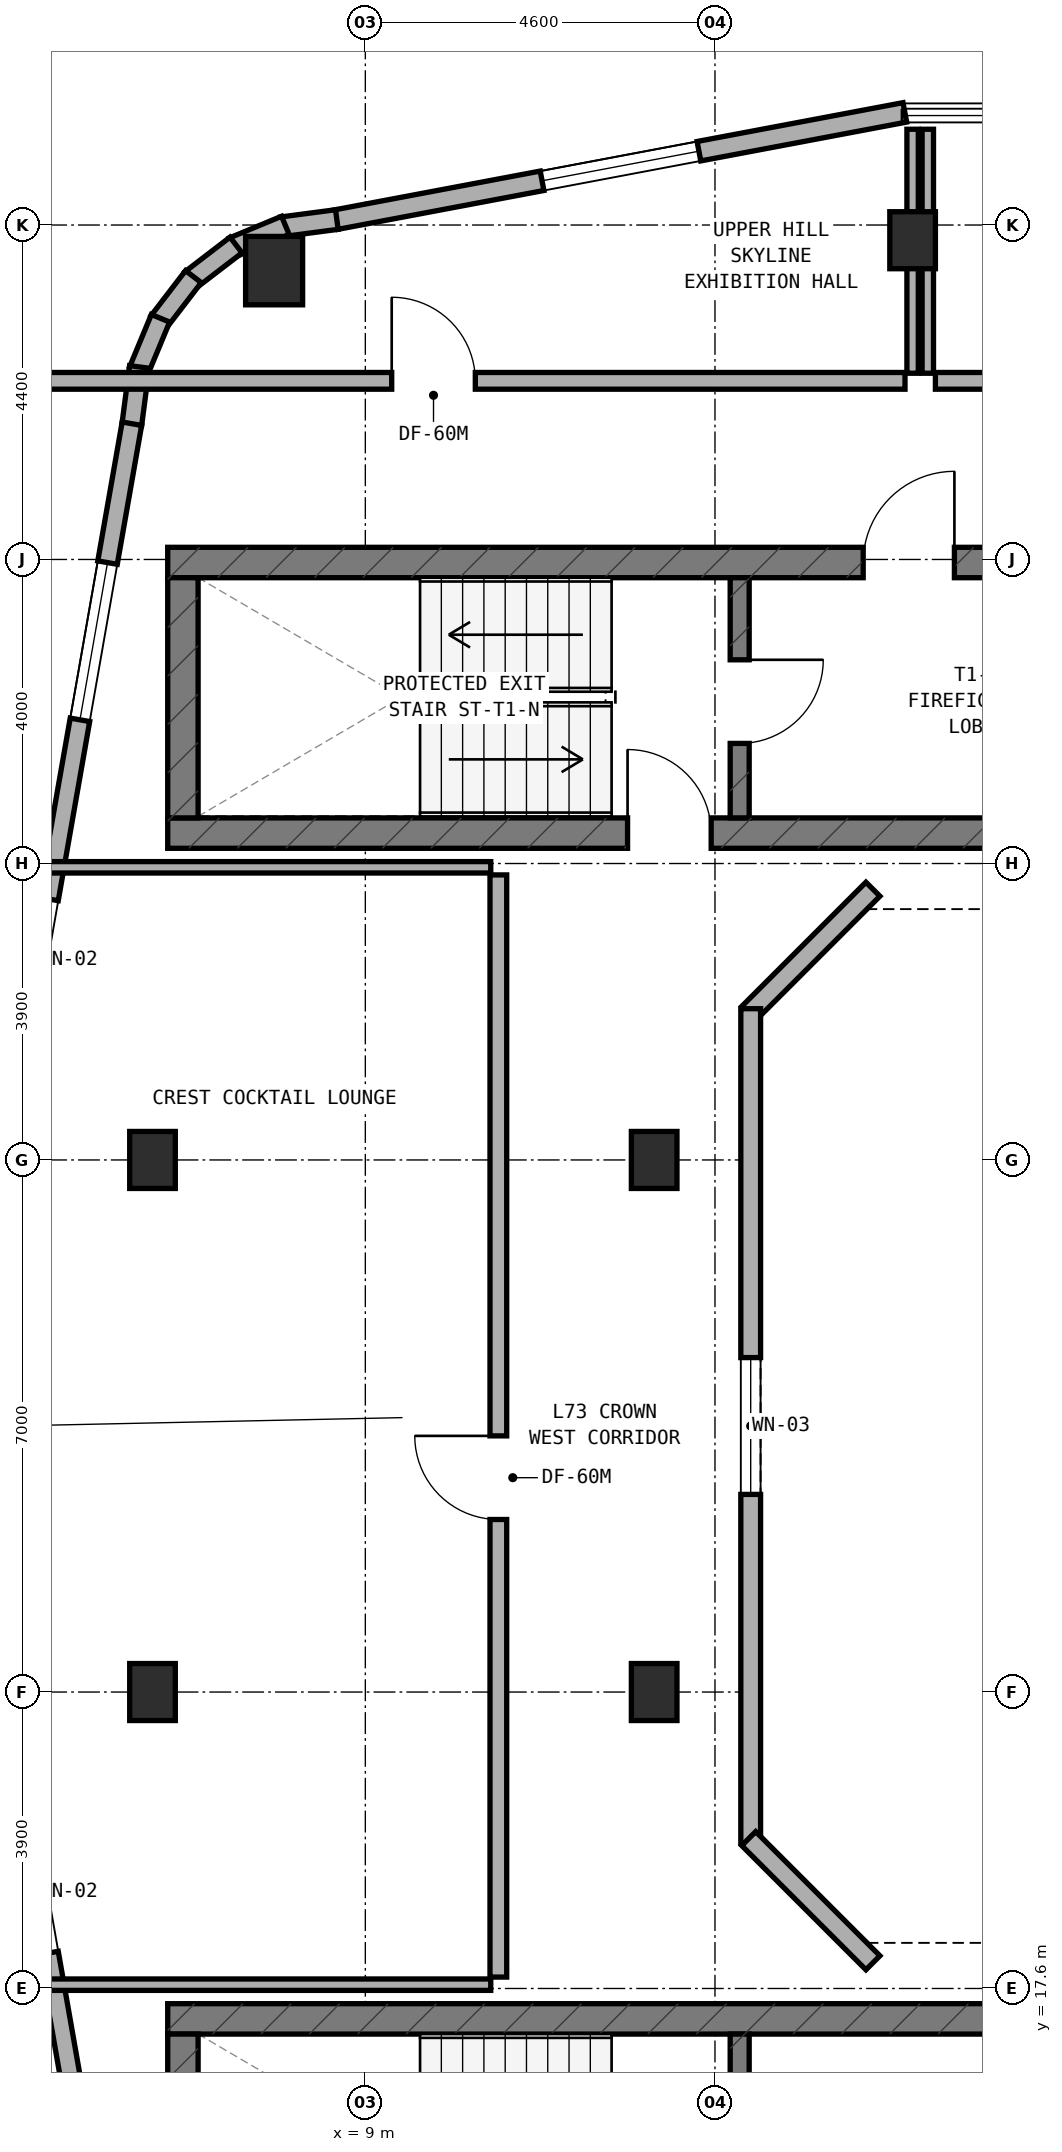
"""IFC4 building model, lengths in metres.
Left out: names, types, materials, properties, quantities, classifications, styles, units other than length and angle.
Written with IfcOpenShell. Run it as: python <this file> out.ifc"""

import sys

from ifc_helpers import new_model, si_unit, direction, frame, frame_2d, origin, origin_2d, place, context, subcontext, project, spatial, rectangle, extrude, element, fill, save


model = new_model("IFC4")
c1 = context("Model", 3, precision=1e-05, world=origin(), true_north=direction((0.0, 1.0)))
c2 = subcontext(c1, "Body", "Model", "MODEL_VIEW")
j1 = project(units=[si_unit("LENGTHUNIT", "METRE"), si_unit("PLANEANGLEUNIT", "RADIAN")], contexts=[c1])
p1 = place(None, origin())
s1 = spatial("IfcSite", under=j1, at=p1, CompositionType="ELEMENT")
p2 = place(p1, origin())
s2 = spatial("IfcBuilding", under=s1, at=p2, CompositionType="ELEMENT")
p3 = place(p2, frame((0.0, 0.0, 268.4)))
s3 = spatial("IfcBuildingStorey", under=s2, at=p3, CompositionType="ELEMENT", Elevation=268.4)
p4 = place(p3, frame((6.4, 32.8, 0.0), z_axis=(0.0, 0.0, 1.0), x_axis=(1.0, 0.0, 0.0)))
e1 = element("IfcWall", 1, at=p4, inside=s3, PredefinedType="SHEAR", context=c2, shape_type="SweptSolid", body=[
    extrude(rectangle(XDim=24.4, YDim=0.4, at=frame_2d((12.2, 0.0))), origin(), (0.0, 0.0, 1.0), 3.6),
])
p5 = place(p4, frame((6.05, 0.0, 0.0)))
e2 = element("IfcOpeningElement", 2, at=p5, cuts=e1, PredefinedType="OPENING", context=c2, shape_type="SweptSolid", body=[
    extrude(rectangle(XDim=1.1, YDim=2.15, at=frame_2d((0.55, 1.075))), frame((0.0, 0.21, 0.0), z_axis=(0.0, -1.0, 0.0), x_axis=(1.0, 0.0, 0.0)), (0.0, 0.0, 1.0), 0.42),
])
p6 = place(p3, frame((6.4, 36.36, 0.0), z_axis=(0.0, 0.0, 1.0), x_axis=(1.0, 0.0, 0.0)))
e3 = element("IfcWall", 3, at=p6, inside=s3, PredefinedType="SHEAR", context=c2, shape_type="SweptSolid", body=[
    extrude(rectangle(XDim=24.4, YDim=0.4, at=frame_2d((12.2, 0.0))), origin(), (0.0, 0.0, 1.0), 3.6),
])
p7 = place(p6, frame((9.15, 0.0, 0.0)))
e4 = element("IfcOpeningElement", 4, at=p7, cuts=e3, PredefinedType="OPENING", context=c2, shape_type="SweptSolid", body=[
    extrude(rectangle(XDim=1.2, YDim=2.15, at=frame_2d((0.6, 1.075))), frame((0.0, 0.21, 0.0), z_axis=(0.0, -1.0, 0.0), x_axis=(1.0, 0.0, 0.0)), (0.0, 0.0, 1.0), 0.42),
])
p8 = place(p6, frame((19.2, 0.0, 0.0)))
e5 = element("IfcOpeningElement", 5, at=p8, cuts=e3, PredefinedType="OPENING", context=c2, shape_type="SweptSolid", body=[
    extrude(rectangle(XDim=0.85, YDim=2.1, at=frame_2d((0.425, 1.05))), frame((0.0, 0.21, 0.0), z_axis=(0.0, -1.0, 0.0), x_axis=(1.0, 0.0, 0.0)), (0.0, 0.0, 1.0), 0.42),
])
p9 = place(p6, frame((16.94, 0.0, 0.0)))
e6 = element("IfcOpeningElement", 6, at=p9, cuts=e3, PredefinedType="OPENING", context=c2, shape_type="SweptSolid", body=[
    extrude(rectangle(XDim=0.85, YDim=2.1, at=frame_2d((0.425, 1.05))), frame((0.0, 0.21, 0.0), z_axis=(0.0, -1.0, 0.0), x_axis=(1.0, 0.0, 0.0)), (0.0, 0.0, 1.0), 0.42),
])
p10 = place(p3, frame((6.6, 33.0, 0.0), z_axis=(0.0, 0.0, 1.0), x_axis=(0.0, 1.0, 0.0)))
e7 = element("IfcWall", 7, at=p10, inside=s3, PredefinedType="SHEAR", context=c2, shape_type="SweptSolid", body=[
    extrude(rectangle(XDim=3.16, YDim=0.4, at=frame_2d((1.58, 0.0))), origin(), (0.0, 0.0, 1.0), 3.6),
])
p11 = place(p3, frame((13.925, 33.0, 0.0), z_axis=(0.0, 0.0, 1.0), x_axis=(0.0, 1.0, 0.0)))
e8 = element("IfcWall", 8, at=p11, inside=s3, PredefinedType="STANDARD", context=c2, shape_type="SweptSolid", body=[
    extrude(rectangle(XDim=3.16, YDim=0.25, at=frame_2d((1.58, 0.0))), origin(), (0.0, 0.0, 1.0), 3.32),
])
p12 = place(p11, frame((0.98, 0.0, 0.0)))
e9 = element("IfcOpeningElement", 9, at=p12, cuts=e8, PredefinedType="OPENING", context=c2, shape_type="SweptSolid", body=[
    extrude(rectangle(XDim=1.1, YDim=2.15, at=frame_2d((0.55, 1.075))), frame((0.0, 0.135, 0.0), z_axis=(0.0, -1.0, 0.0), x_axis=(1.0, 0.0, 0.0)), (0.0, 0.0, 1.0), 0.27),
])
p13 = place(p3, frame((6.4, 17.2, 0.0), z_axis=(0.0, 0.0, 1.0), x_axis=(1.0, 0.0, 0.0)))
e10 = element("IfcWall", 10, at=p13, inside=s3, PredefinedType="SHEAR", context=c2, shape_type="SweptSolid", body=[
    extrude(rectangle(XDim=24.4, YDim=0.4, at=frame_2d((12.2, 0.0))), origin(), (0.0, 0.0, 1.0), 3.6),
])
p14 = place(p3, frame((6.6, 13.84, 0.0), z_axis=(0.0, 0.0, 1.0), x_axis=(0.0, 1.0, 0.0)))
e11 = element("IfcWall", 11, at=p14, inside=s3, PredefinedType="SHEAR", context=c2, shape_type="SweptSolid", body=[
    extrude(rectangle(XDim=3.16, YDim=0.4, at=frame_2d((1.58, 0.0))), origin(), (0.0, 0.0, 1.0), 3.6),
])
p15 = place(p3, frame((13.925, 13.84, 0.0), z_axis=(0.0, 0.0, 1.0), x_axis=(0.0, 1.0, 0.0)))
e12 = element("IfcWall", 12, at=p15, inside=s3, PredefinedType="STANDARD", context=c2, shape_type="SweptSolid", body=[
    extrude(rectangle(XDim=3.16, YDim=0.25, at=frame_2d((1.58, 0.0))), origin(), (0.0, 0.0, 1.0), 3.32),
])
p16 = place(p15, frame((0.98, 0.0, 0.0)))
e13 = element("IfcOpeningElement", 13, at=p16, cuts=e12, PredefinedType="OPENING", context=c2, shape_type="SweptSolid", body=[
    extrude(rectangle(XDim=1.1, YDim=2.15, at=frame_2d((0.55, 1.075))), frame((0.0, 0.135, 0.0), z_axis=(0.0, -1.0, 0.0), x_axis=(1.0, 0.0, 0.0)), (0.0, 0.0, 1.0), 0.27),
])
for number, where, z_axis, x_axis in (
    (14, (16.2, 40.6, 0.0), (0.0, 0.0, 1.0), (1.0, 0.0, 0.0)),
    (15, (6.2, 21.5, 0.0), (0.0, 0.0, 1.0), (1.0, 0.0, 0.0)),
    (16, (6.2, 28.5, 0.0), (0.0, 0.0, 1.0), (1.0, 0.0, 0.0)),
):
    element("IfcColumn", number, at=place(p3, frame(where, z_axis=z_axis, x_axis=x_axis)), inside=s3, PredefinedType="COLUMN", context=c2, shape_type="SweptSolid", body=[
        extrude(rectangle(XDim=0.6, YDim=0.75, at=origin_2d()), origin(), (0.0, 0.0, 1.0), 3.6),
    ])
p17 = place(p3, frame((7.8, 40.2, 0.0), z_axis=(0.0, 0.0, 1.0), x_axis=(1.0, 0.0, 0.0)))
e17 = element("IfcColumn", 17, at=p17, inside=s3, PredefinedType="COLUMN", context=c2, shape_type="SweptSolid", body=[
    extrude(rectangle(XDim=0.75, YDim=0.9, at=origin_2d()), origin(), (0.0, 0.0, 1.0), 3.6),
])
for number, where, z_axis, x_axis in (
    (18, (12.8, 21.5, 0.0), (0.0, 0.0, 1.0), (1.0, 0.0, 0.0)),
    (19, (12.8, 28.5, 0.0), (0.0, 0.0, 1.0), (1.0, 0.0, 0.0)),
):
    element("IfcColumn", number, at=place(p3, frame(where, z_axis=z_axis, x_axis=x_axis)), inside=s3, PredefinedType="COLUMN", context=c2, shape_type="SweptSolid", body=[
        extrude(rectangle(XDim=0.6, YDim=0.75, at=origin_2d()), origin(), (0.0, 0.0, 1.0), 3.6),
    ])
p18 = place(p3, frame((16.098, 42.282, 0.0), z_axis=(0.0, 0.0, 1.0), x_axis=(-0.982680718126, -0.185306789468, 0.0)))
e20 = element("IfcWall", 20, at=p18, inside=s3, PredefinedType="STANDARD", context=c2, shape_type="SweptSolid", body=[
    extrude(rectangle(XDim=7.614, YDim=0.26, at=frame_2d((3.807, 0.0))), origin(), (0.0, 0.0, 1.0), 3.32),
])
p19 = place(p18, frame((2.757, 0.0, 0.85)))
e21 = element("IfcOpeningElement", 21, at=p19, cuts=e20, PredefinedType="OPENING", context=c2, shape_type="SweptSolid", body=[
    extrude(rectangle(XDim=2.1, YDim=1.5, at=frame_2d((1.05, 0.75))), frame((0.0, 0.14, 0.0), z_axis=(0.0, -1.0, 0.0), x_axis=(1.0, 0.0, 0.0)), (0.0, 0.0, 1.0), 0.28),
])
p20 = place(p3, frame((8.625, 40.872, 0.0), z_axis=(0.0, 0.0, 1.0), x_axis=(-0.991480488834, -0.130255288807, 0.0)))
e22 = element("IfcWall", 22, at=p20, inside=s3, PredefinedType="STANDARD", context=c2, shape_type="SweptSolid", body=[
    extrude(rectangle(XDim=0.729, YDim=0.26, at=frame_2d((0.365, 0.0))), origin(), (0.0, 0.0, 1.0), 3.32),
])
p21 = place(p3, frame((7.948, 40.795, 0.0), z_axis=(0.0, 0.0, 1.0), x_axis=(-0.923637576129, -0.383267045233, 0.0)))
e23 = element("IfcWall", 23, at=p21, inside=s3, PredefinedType="STANDARD", context=c2, shape_type="SweptSolid", body=[
    extrude(rectangle(XDim=0.746, YDim=0.26, at=frame_2d((0.373, 0.0))), origin(), (0.0, 0.0, 1.0), 3.32),
])
for number, where, z_axis, x_axis in (
    (24, (7.299, 40.537, 0.0), (0.0, 0.0, 1.0), (-0.793, -0.609, 0.0)),
    (25, (6.738, 40.121, 0.0), (0.0, 0.0, 1.0), (-0.609, -0.793, 0.0)),
):
    element("IfcWall", number, at=place(p3, frame(where, z_axis=z_axis, x_axis=x_axis)), inside=s3, PredefinedType="STANDARD", context=c2, shape_type="SweptSolid", body=[
        extrude(rectangle(XDim=0.746, YDim=0.26, at=frame_2d((0.373, 0.0))), origin(), (0.0, 0.0, 1.0), 3.32),
    ])
p22 = place(p3, frame((6.305, 39.573, 0.0), z_axis=(0.0, 0.0, 1.0), x_axis=(-0.383267045233, -0.923637576129, 0.0)))
e26 = element("IfcWall", 26, at=p22, inside=s3, PredefinedType="STANDARD", context=c2, shape_type="SweptSolid", body=[
    extrude(rectangle(XDim=0.746, YDim=0.26, at=frame_2d((0.373, 0.0))), origin(), (0.0, 0.0, 1.0), 3.32),
])
p23 = place(p3, frame((6.027, 38.933, 0.0), z_axis=(0.0, 0.0, 1.0), x_axis=(-0.129653178221, -0.991559404866, 0.0)))
e27 = element("IfcWall", 27, at=p23, inside=s3, PredefinedType="STANDARD", context=c2, shape_type="SweptSolid", body=[
    extrude(rectangle(XDim=0.764, YDim=0.26, at=frame_2d((0.382, 0.0))), origin(), (0.0, 0.0, 1.0), 3.32),
])
p24 = place(p3, frame((5.929, 38.186, 0.0), z_axis=(0.0, 0.0, 1.0), x_axis=(-0.172801004781, -0.98495675679, 0.0)))
e28 = element("IfcWall", 28, at=p24, inside=s3, PredefinedType="STANDARD", context=c2, shape_type="SweptSolid", body=[
    extrude(rectangle(XDim=8.165, YDim=0.26, at=frame_2d((4.083, 0.0))), origin(), (0.0, 0.0, 1.0), 3.32),
])
p25 = place(p24, frame((1.855, 0.0, 0.85)))
e29 = element("IfcOpeningElement", 29, at=p25, cuts=e28, PredefinedType="OPENING", context=c2, shape_type="SweptSolid", body=[
    extrude(rectangle(XDim=2.1, YDim=1.5, at=frame_2d((1.05, 0.75))), frame((0.0, 0.14, 0.0), z_axis=(0.0, -1.0, 0.0), x_axis=(1.0, 0.0, 0.0)), (0.0, 0.0, 1.0), 0.28),
])
p26 = place(p24, frame((6.348, 0.0, 0.85)))
e30 = element("IfcOpeningElement", 30, at=p26, cuts=e28, PredefinedType="OPENING", context=c2, shape_type="SweptSolid", body=[
    extrude(rectangle(XDim=1.5, YDim=1.5, at=frame_2d((0.75, 0.75))), frame((0.0, 0.14, 0.0), z_axis=(0.0, -1.0, 0.0), x_axis=(1.0, 0.0, 0.0)), (0.0, 0.0, 1.0), 0.28),
])
p27 = place(p3, frame((4.518, 19.856, 0.0), z_axis=(0.0, 0.0, 1.0), x_axis=(0.172801004781, -0.98495675679, 0.0)))
e31 = element("IfcWall", 31, at=p27, inside=s3, PredefinedType="STANDARD", context=c2, shape_type="SweptSolid", body=[
    extrude(rectangle(XDim=8.165, YDim=0.26, at=frame_2d((4.083, 0.0))), origin(), (0.0, 0.0, 1.0), 3.32),
])
p28 = place(p27, frame((0.317, 0.0, 0.85)))
e32 = element("IfcOpeningElement", 32, at=p28, cuts=e31, PredefinedType="OPENING", context=c2, shape_type="SweptSolid", body=[
    extrude(rectangle(XDim=1.5, YDim=1.5, at=frame_2d((0.75, 0.75))), frame((0.0, 0.14, 0.0), z_axis=(0.0, -1.0, 0.0), x_axis=(1.0, 0.0, 0.0)), (0.0, 0.0, 1.0), 0.28),
])
p29 = place(p27, frame((4.21, 0.0, 0.85)))
e33 = element("IfcOpeningElement", 33, at=p29, cuts=e31, PredefinedType="OPENING", context=c2, shape_type="SweptSolid", body=[
    extrude(rectangle(XDim=2.1, YDim=1.5, at=frame_2d((1.05, 0.75))), frame((0.0, 0.14, 0.0), z_axis=(0.0, -1.0, 0.0), x_axis=(1.0, 0.0, 0.0)), (0.0, 0.0, 1.0), 0.28),
])
p30 = place(p3, frame((15.678, 32.062, 0.0), z_axis=(0.0, 0.0, 1.0), x_axis=(-0.707106781187, -0.707106781187, 0.0)))
e34 = element("IfcWall", 34, at=p30, inside=s3, PredefinedType="STANDARD", context=c2, shape_type="SweptSolid", body=[
    extrude(rectangle(XDim=2.311, YDim=0.26, at=frame_2d((1.155, 0.0))), origin(), (0.0, 0.0, 1.0), 3.32),
])
p31 = place(p3, frame((14.07, 30.49, 0.0), z_axis=(0.0, 0.0, 1.0), x_axis=(0.0, -1.0, 0.0)))
e35 = element("IfcWall", 35, at=p31, inside=s3, PredefinedType="STANDARD", context=c2, shape_type="SweptSolid", body=[
    extrude(rectangle(XDim=10.98, YDim=0.26, at=frame_2d((5.49, 0.0))), origin(), (0.0, 0.0, 1.0), 3.32),
])
p32 = place(p31, frame((4.59, 0.0, 0.85)))
e36 = element("IfcOpeningElement", 36, at=p32, cuts=e35, PredefinedType="OPENING", context=c2, shape_type="SweptSolid", body=[
    extrude(rectangle(XDim=1.8, YDim=1.5, at=frame_2d((0.9, 0.75))), frame((0.0, 0.14, 0.0), z_axis=(0.0, -1.0, 0.0), x_axis=(1.0, 0.0, 0.0)), (0.0, 0.0, 1.0), 0.28),
])
p33 = place(p3, frame((14.044, 19.572, 0.0), z_axis=(0.0, 0.0, 1.0), x_axis=(0.707106781187, -0.707106781187, 0.0)))
e37 = element("IfcWall", 37, at=p33, inside=s3, PredefinedType="STANDARD", context=c2, shape_type="SweptSolid", body=[
    extrude(rectangle(XDim=2.311, YDim=0.26, at=frame_2d((1.155, 0.0))), origin(), (0.0, 0.0, 1.0), 3.32),
])
for number, where, z_axis, x_axis in (
    (38, (4.74, 17.65, 0.0), (0.0, 0.0, 1.0), (1.0, 0.0, 0.0)),
    (39, (4.74, 32.35, 0.0), (0.0, 0.0, 1.0), (1.0, 0.0, 0.0)),
):
    element("IfcWall", number, at=place(p3, frame(where, z_axis=z_axis, x_axis=x_axis)), inside=s3, PredefinedType="PARTITIONING", context=c2, shape_type="SweptSolid", body=[
        extrude(rectangle(XDim=5.91, YDim=0.15, at=frame_2d((2.955, 0.0))), origin(), (0.0, 0.0, 1.0), 3.32),
    ])
p34 = place(p3, frame((10.75, 17.75, 0.0), z_axis=(0.0, 0.0, 1.0), x_axis=(0.0, 1.0, 0.0)))
e40 = element("IfcWall", 40, at=p34, inside=s3, PredefinedType="SOLIDWALL", context=c2, shape_type="SweptSolid", body=[
    extrude(rectangle(XDim=14.5, YDim=0.22, at=frame_2d((7.25, 0.0))), origin(), (0.0, 0.0, 1.0), 2.795),
])
p35 = place(p34, frame((6.02, 0.0, 0.0)))
e41 = element("IfcOpeningElement", 41, at=p35, cuts=e40, PredefinedType="OPENING", context=c2, shape_type="SweptSolid", body=[
    extrude(rectangle(XDim=1.1, YDim=2.1, at=frame_2d((0.55, 1.05))), frame((0.0, 0.12, 0.0), z_axis=(0.0, -1.0, 0.0), x_axis=(1.0, 0.0, 0.0)), (0.0, 0.0, 1.0), 0.24),
])
p36 = place(p3, frame((16.2, 38.85, 0.0), z_axis=(0.0, 0.0, 1.0), x_axis=(0.0, 1.0, 0.0)))
e42 = element("IfcWall", 42, at=p36, inside=s3, PredefinedType="PARTITIONING", context=c2, shape_type="SweptSolid", body=[
    extrude(rectangle(XDim=3.21, YDim=0.15, at=frame_2d((1.605, 0.0))), origin(), (0.0, 0.0, 1.0), 2.795),
])
p37 = place(p3, frame((4.74, 38.75, 0.0), z_axis=(0.0, 0.0, 1.0), x_axis=(1.0, 0.0, 0.0)))
e43 = element("IfcWall", 43, at=p37, inside=s3, PredefinedType="SOLIDWALL", context=c2, shape_type="SweptSolid", body=[
    extrude(rectangle(XDim=11.36, YDim=0.22, at=frame_2d((5.68, 0.0))), origin(), (0.0, 0.0, 1.0), 2.795),
])
p38 = place(p37, frame((4.607, 0.0, 0.0)))
e44 = element("IfcOpeningElement", 44, at=p38, cuts=e43, PredefinedType="OPENING", context=c2, shape_type="SweptSolid", body=[
    extrude(rectangle(XDim=1.1, YDim=2.1, at=frame_2d((0.55, 1.05))), frame((0.0, 0.12, 0.0), z_axis=(0.0, -1.0, 0.0), x_axis=(1.0, 0.0, 0.0)), (0.0, 0.0, 1.0), 0.24),
])
p39 = place(p3, frame((16.4, 38.85, 0.0), z_axis=(0.0, 0.0, 1.0), x_axis=(0.0, 1.0, 0.0)))
e45 = element("IfcWall", 45, at=p39, inside=s3, PredefinedType="PARTITIONING", context=c2, shape_type="SweptSolid", body=[
    extrude(rectangle(XDim=3.21, YDim=0.15, at=frame_2d((1.605, 0.0))), origin(), (0.0, 0.0, 1.0), 3.015),
])
p40 = place(p3, frame((16.5, 38.75, 0.0), z_axis=(0.0, 0.0, 1.0), x_axis=(1.0, 0.0, 0.0)))
e46 = element("IfcWall", 46, at=p40, inside=s3, PredefinedType="SOLIDWALL", context=c2, shape_type="SweptSolid", body=[
    extrude(rectangle(XDim=4.0, YDim=0.22, at=frame_2d((2.0, 0.0))), origin(), (0.0, 0.0, 1.0), 2.995),
])
p41 = place(p40, frame((1.295, 0.0, 0.0)))
e47 = element("IfcOpeningElement", 47, at=p41, cuts=e46, PredefinedType="OPENING", context=c2, shape_type="SweptSolid", body=[
    extrude(rectangle(XDim=1.1, YDim=2.1, at=frame_2d((0.55, 1.05))), frame((0.0, 0.12, 0.0), z_axis=(0.0, -1.0, 0.0), x_axis=(1.0, 0.0, 0.0)), (0.0, 0.0, 1.0), 0.24),
])
p42 = place(p19, origin())
e48 = element("IfcWindow", 48, at=p42, inside=s3, PartitioningType="SINGLE_PANEL", PredefinedType="WINDOW", context=c2, shape_type="SweptSolid", body=[
    extrude(rectangle(XDim=2.1, YDim=1.5, at=frame_2d((1.05, 0.75))), frame((0.0, 0.03, 0.0), z_axis=(0.0, -1.0, 0.0), x_axis=(1.0, 0.0, 0.0)), (0.0, 0.0, 1.0), 0.06),
])
fill(e21, e48)
p43 = place(p25, origin())
e49 = element("IfcWindow", 49, at=p43, inside=s3, PartitioningType="SINGLE_PANEL", PredefinedType="WINDOW", context=c2, shape_type="SweptSolid", body=[
    extrude(rectangle(XDim=2.1, YDim=1.5, at=frame_2d((1.05, 0.75))), frame((0.0, 0.03, 0.0), z_axis=(0.0, -1.0, 0.0), x_axis=(1.0, 0.0, 0.0)), (0.0, 0.0, 1.0), 0.06),
])
fill(e29, e49)
p44 = place(p32, origin())
e50 = element("IfcWindow", 50, at=p44, inside=s3, PartitioningType="SINGLE_PANEL", PredefinedType="WINDOW", context=c2, shape_type="SweptSolid", body=[
    extrude(rectangle(XDim=1.8, YDim=1.5, at=frame_2d((0.9, 0.75))), frame((0.0, 0.03, 0.0), z_axis=(0.0, -1.0, 0.0), x_axis=(1.0, 0.0, 0.0)), (0.0, 0.0, 1.0), 0.06),
])
fill(e36, e50)
p45 = place(p12, frame((1.1, 0.0, 0.0), z_axis=(0.0, 0.0, 1.0), x_axis=(-1.0, 0.0, 0.0)))
e51 = element("IfcDoor", 51, at=p45, inside=s3, OperationType="SINGLE_SWING_LEFT", PredefinedType="DOOR", context=c2, shape_type="SweptSolid", body=[
    extrude(rectangle(XDim=1.1, YDim=2.15, at=frame_2d((0.55, 1.075))), frame((0.0, 0.025, 0.0), z_axis=(0.0, -1.0, 0.0), x_axis=(1.0, 0.0, 0.0)), (0.0, 0.0, 1.0), 0.05),
])
fill(e9, e51)
p46 = place(p7, origin())
e52 = element("IfcDoor", 52, at=p46, inside=s3, OperationType="SINGLE_SWING_RIGHT", PredefinedType="DOOR", context=c2, shape_type="SweptSolid", body=[
    extrude(rectangle(XDim=1.2, YDim=2.15, at=frame_2d((0.6, 1.075))), frame((0.0, 0.025, 0.0), z_axis=(0.0, -1.0, 0.0), x_axis=(1.0, 0.0, 0.0)), (0.0, 0.0, 1.0), 0.05),
])
fill(e4, e52)
p47 = place(p5, origin())
e53 = element("IfcDoor", 53, at=p47, inside=s3, OperationType="SINGLE_SWING_LEFT", PredefinedType="DOOR", context=c2, shape_type="SweptSolid", body=[
    extrude(rectangle(XDim=1.1, YDim=2.15, at=frame_2d((0.55, 1.075))), frame((0.0, 0.025, 0.0), z_axis=(0.0, -1.0, 0.0), x_axis=(1.0, 0.0, 0.0)), (0.0, 0.0, 1.0), 0.05),
])
fill(e2, e53)
p48 = place(p35, origin())
e54 = element("IfcDoor", 54, at=p48, inside=s3, OperationType="SINGLE_SWING_RIGHT", PredefinedType="DOOR", context=c2, shape_type="SweptSolid", body=[
    extrude(rectangle(XDim=1.1, YDim=2.1, at=frame_2d((0.55, 1.05))), frame((0.0, 0.025, 0.0), z_axis=(0.0, -1.0, 0.0), x_axis=(1.0, 0.0, 0.0)), (0.0, 0.0, 1.0), 0.05),
])
fill(e41, e54)
p49 = place(p38, origin())
e55 = element("IfcDoor", 55, at=p49, inside=s3, OperationType="SINGLE_SWING_LEFT", PredefinedType="DOOR", context=c2, shape_type="SweptSolid", body=[
    extrude(rectangle(XDim=1.1, YDim=2.1, at=frame_2d((0.55, 1.05))), frame((0.0, 0.025, 0.0), z_axis=(0.0, -1.0, 0.0), x_axis=(1.0, 0.0, 0.0)), (0.0, 0.0, 1.0), 0.05),
])
fill(e44, e55)
save(model, sys.argv[1])
